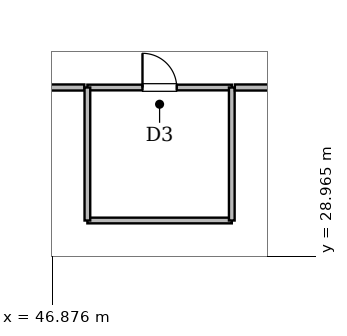
"""IFC4 building model, lengths in metres.
Left out: names, types, materials, properties, quantities, classifications, styles, units other than length and angle.
Written with IfcOpenShell. Run it as: python <this file> out.ifc"""

import sys

from ifc_helpers import new_model, si_unit, direction, frame, frame_2d, origin, place, context, subcontext, project, spatial, rectangle, extrude, element, fill, save


model = new_model("IFC4")
c1 = context("Model", 3, precision=1e-05, world=origin(), true_north=direction((0.0, 1.0)))
c2 = subcontext(c1, "Body", "Model", "MODEL_VIEW")
j1 = project(units=[si_unit("LENGTHUNIT", "METRE"), si_unit("PLANEANGLEUNIT", "RADIAN")], contexts=[c1])
p1 = place(None, origin())
s1 = spatial("IfcSite", under=j1, at=p1, CompositionType="ELEMENT")
p2 = place(p1, origin())
s2 = spatial("IfcBuilding", under=s1, at=p2, CompositionType="ELEMENT")
p3 = place(p2, frame((0.0, 0.0, 9.6)))
s3 = spatial("IfcBuildingStorey", under=s2, at=p3, CompositionType="ELEMENT", Elevation=9.6)
p4 = place(p3, frame((47.8, 33.4, 0.0), z_axis=(0.0, 0.0, 1.0), x_axis=(1.0, 0.0, 0.0)))
e1 = element("IfcWall", 1, at=p4, inside=s3, PredefinedType="PLUMBINGWALL", context=c2, shape_type="SweptSolid", body=[
    extrude(rectangle(XDim=3.8, YDim=0.15, at=frame_2d((1.9, 0.0))), origin(), (0.0, 0.0, 1.0), 3.588),
])
p5 = place(p4, frame((1.45, 0.0, 0.0)))
e2 = element("IfcOpeningElement", 2, at=p5, cuts=e1, PredefinedType="OPENING", context=c2, shape_type="SweptSolid", body=[
    extrude(rectangle(XDim=0.9, YDim=2.1, at=frame_2d((0.45, 1.05))), frame((0.0, 0.085, 0.0), z_axis=(0.0, -1.0, 0.0), x_axis=(1.0, 0.0, 0.0)), (0.0, 0.0, 1.0), 0.17),
])
p6 = place(p3, frame((42.08, 33.4, 0.0), z_axis=(0.0, 0.0, 1.0), x_axis=(1.0, 0.0, 0.0)))
e3 = element("IfcWall", 3, at=p6, inside=s3, PredefinedType="SOLIDWALL", context=c2, shape_type="SweptSolid", body=[
    extrude(rectangle(XDim=5.64, YDim=0.16, at=frame_2d((2.82, 0.0))), origin(), (0.0, 0.0, 1.0), 4.5),
])
p7 = place(p3, frame((47.8, 29.9, 0.0), z_axis=(0.0, 0.0, 1.0), x_axis=(1.0, 0.0, 0.0)))
e4 = element("IfcWall", 4, at=p7, inside=s3, PredefinedType="PLUMBINGWALL", context=c2, shape_type="SweptSolid", body=[
    extrude(rectangle(XDim=3.8, YDim=0.15, at=frame_2d((1.9, 0.0))), origin(), (0.0, 0.0, 1.0), 4.5),
])
for number, where, z_axis, x_axis in (
    (5, (47.8, 33.4, 0.0), (0.0, 0.0, 1.0), (0.0, -1.0, 0.0)),
    (6, (51.6, 29.9, 0.0), (0.0, 0.0, 1.0), (0.0, 1.0, 0.0)),
):
    element("IfcWall", number, at=place(p3, frame(where, z_axis=z_axis, x_axis=x_axis)), inside=s3, PredefinedType="PLUMBINGWALL", context=c2, shape_type="SweptSolid", body=[
        extrude(rectangle(XDim=3.5, YDim=0.15, at=frame_2d((1.75, 0.0))), origin(), (0.0, 0.0, 1.0), 3.588),
    ])
p8 = place(p3, frame((51.68, 33.4, 0.0), z_axis=(0.0, 0.0, 1.0), x_axis=(1.0, 0.0, 0.0)))
e7 = element("IfcWall", 7, at=p8, inside=s3, PredefinedType="SOLIDWALL", context=c2, shape_type="SweptSolid", body=[
    extrude(rectangle(XDim=2.84, YDim=0.16, at=frame_2d((1.42, 0.0))), origin(), (0.0, 0.0, 1.0), 3.588),
])
p9 = place(p5, origin())
e8 = element("IfcDoor", 8, at=p9, inside=s3, OperationType="SINGLE_SWING_LEFT", PredefinedType="DOOR", context=c2, shape_type="SweptSolid", body=[
    extrude(rectangle(XDim=0.9, YDim=2.1, at=frame_2d((0.45, 1.05))), frame((0.0, 0.025, 0.0), z_axis=(0.0, -1.0, 0.0), x_axis=(1.0, 0.0, 0.0)), (0.0, 0.0, 1.0), 0.05),
])
fill(e2, e8)
save(model, sys.argv[1])
